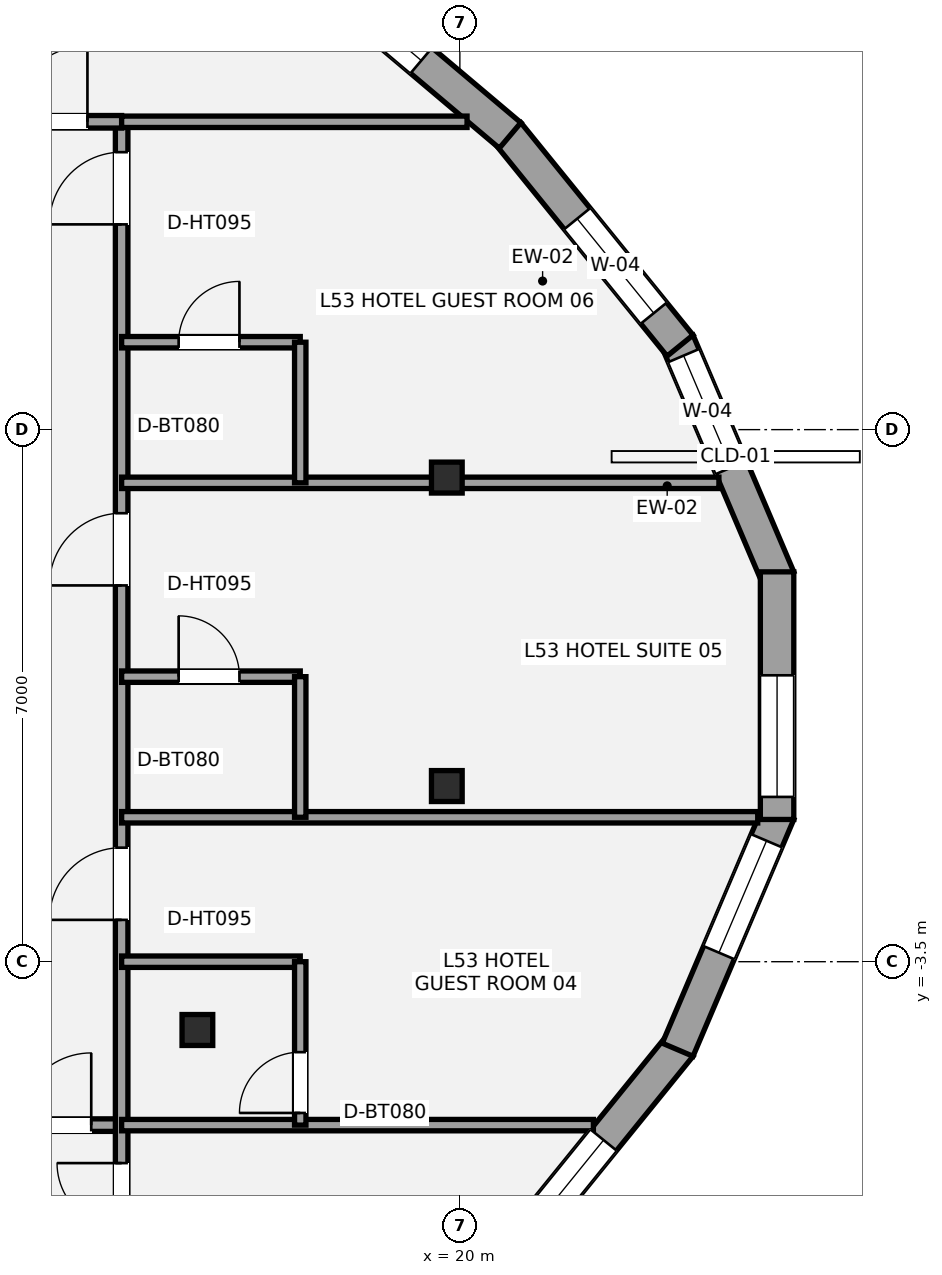
"""IFC4 building model, lengths in metres.
Left out: names, types, materials, properties, quantities, classifications, styles, units other than length and angle.
Written with IfcOpenShell. Run it as: python <this file> out.ifc"""

import sys

from ifc_helpers import new_model, si_unit, direction, frame, frame_2d, origin, origin_2d, place, context, subcontext, project, spatial, rectangle, i_section, extrude, element, fill, save


model = new_model("IFC4")
c1 = context("Model", 3, precision=1e-05, world=origin(), true_north=direction((0.0, 1.0)))
c2 = subcontext(c1, "Body", "Model", "MODEL_VIEW")
j1 = project(units=[si_unit("LENGTHUNIT", "METRE"), si_unit("PLANEANGLEUNIT", "RADIAN")], contexts=[c1])
p1 = place(None, origin())
s1 = spatial("IfcSite", under=j1, at=p1, CompositionType="ELEMENT")
p2 = place(p1, origin())
s2 = spatial("IfcBuilding", under=s1, at=p2, CompositionType="ELEMENT")
p3 = place(p2, frame((0.0, 0.0, 191.8)))
s3 = spatial("IfcBuildingStorey", under=s2, at=p3, CompositionType="ELEMENT", Elevation=191.8)
for number, where, z_axis, x_axis in (
    (1, (19.828, 2.869, 0.0), (0.0, 0.0, 1.0), (1.0, 0.0, 0.0)),
    (2, (16.547, -4.398, 0.0), (0.0, 0.0, 1.0), (1.0, 0.0, 0.0)),
    (3, (19.828, -1.189, 0.0), (0.0, 0.0, 1.0), (1.0, 0.0, 0.0)),
):
    element("IfcColumn", number, at=place(p3, frame(where, z_axis=z_axis, x_axis=x_axis)), inside=s3, PredefinedType="COLUMN", context=c2, shape_type="SweptSolid", body=[
        extrude(i_section(OverallWidth=0.404, OverallDepth=0.407, WebThickness=0.027, FlangeThickness=0.044, at=origin_2d()), origin(), (0.0, 0.0, 1.0), 3.2),
    ])
p4 = place(p3, frame((22.865, 4.658, 0.0), z_axis=(0.0, 0.0, 1.0), x_axis=(0.391568154721, -0.920149107595, 0.0)))
e4 = element("IfcWall", 4, at=p4, inside=s3, PredefinedType="STANDARD", context=c2, shape_type="SweptSolid", body=[
    extrude(rectangle(XDim=3.385, YDim=0.44, at=frame_2d((1.693, 0.0))), origin(), (0.0, 0.0, 1.0), 2.315),
])
p5 = place(p4, frame((0.2, 0.0, 0.58)))
e5 = element("IfcOpeningElement", 5, at=p5, cuts=e4, PredefinedType="OPENING", context=c2, shape_type="SweptSolid", body=[
    extrude(rectangle(XDim=1.6, YDim=1.55, at=frame_2d((0.8, 0.775))), frame((0.0, 0.23, 0.0), z_axis=(0.0, -1.0, 0.0), x_axis=(1.0, 0.0, 0.0)), (0.0, 0.0, 1.0), 0.46),
])
p6 = place(p3, frame((20.632, 7.4, 0.0), z_axis=(0.0, 0.0, 1.0), x_axis=(0.629697919329, -0.776840093193, 0.0)))
e6 = element("IfcWall", 6, at=p6, inside=s3, PredefinedType="STANDARD", context=c2, shape_type="SweptSolid", body=[
    extrude(rectangle(XDim=3.597, YDim=0.44, at=frame_2d((1.799, 0.0))), origin(), (0.0, 0.0, 1.0), 2.315),
])
p7 = place(p6, frame((1.448, 0.0, 0.58)))
e7 = element("IfcOpeningElement", 7, at=p7, cuts=e6, PredefinedType="OPENING", context=c2, shape_type="SweptSolid", body=[
    extrude(rectangle(XDim=1.6, YDim=1.55, at=frame_2d((0.8, 0.775))), frame((0.0, 0.23, 0.0), z_axis=(0.0, -1.0, 0.0), x_axis=(1.0, 0.0, 0.0)), (0.0, 0.0, 1.0), 0.46),
])
p8 = place(p3, frame((17.779, 9.802, 0.0), z_axis=(0.0, 0.0, 1.0), x_axis=(0.764269547527, -0.644896936512, 0.0)))
e8 = element("IfcWall", 8, at=p8, inside=s3, PredefinedType="STANDARD", context=c2, shape_type="SweptSolid", body=[
    extrude(rectangle(XDim=3.771, YDim=0.44, at=frame_2d((1.886, 0.0))), origin(), (0.0, 0.0, 1.0), 2.315),
])
p9 = place(p8, frame((0.643, 0.0, 0.58)))
e9 = element("IfcOpeningElement", 9, at=p9, cuts=e8, PredefinedType="OPENING", context=c2, shape_type="SweptSolid", body=[
    extrude(rectangle(XDim=1.6, YDim=1.55, at=frame_2d((0.8, 0.775))), frame((0.0, 0.23, 0.0), z_axis=(0.0, -1.0, 0.0), x_axis=(1.0, 0.0, 0.0)), (0.0, 0.0, 1.0), 0.46),
])
p10 = place(p3, frame((22.897, -4.605, 0.0), z_axis=(0.0, 0.0, 1.0), x_axis=(-0.629697919329, -0.776840093193, 0.0)))
e10 = element("IfcWall", 10, at=p10, inside=s3, PredefinedType="STANDARD", context=c2, shape_type="SweptSolid", body=[
    extrude(rectangle(XDim=3.597, YDim=0.44, at=frame_2d((1.799, 0.0))), origin(), (0.0, 0.0, 1.0), 2.315),
])
p11 = place(p10, frame((1.597, 0.0, 0.58)))
e11 = element("IfcOpeningElement", 11, at=p11, cuts=e10, PredefinedType="OPENING", context=c2, shape_type="SweptSolid", body=[
    extrude(rectangle(XDim=1.6, YDim=1.55, at=frame_2d((0.8, 0.775))), frame((0.0, 0.23, 0.0), z_axis=(0.0, -1.0, 0.0), x_axis=(1.0, 0.0, 0.0)), (0.0, 0.0, 1.0), 0.46),
])
p12 = place(p3, frame((24.191, -1.543, 0.0), z_axis=(0.0, 0.0, 1.0), x_axis=(-0.391568154721, -0.920149107595, 0.0)))
e12 = element("IfcWall", 12, at=p12, inside=s3, PredefinedType="STANDARD", context=c2, shape_type="SweptSolid", body=[
    extrude(rectangle(XDim=3.385, YDim=0.44, at=frame_2d((1.693, 0.0))), origin(), (0.0, 0.0, 1.0), 2.315),
])
p13 = place(p12, frame((0.398, 0.0, 0.58)))
e13 = element("IfcOpeningElement", 13, at=p13, cuts=e12, PredefinedType="OPENING", context=c2, shape_type="SweptSolid", body=[
    extrude(rectangle(XDim=1.6, YDim=1.55, at=frame_2d((0.8, 0.775))), frame((0.0, 0.23, 0.0), z_axis=(0.0, -1.0, 0.0), x_axis=(1.0, 0.0, 0.0)), (0.0, 0.0, 1.0), 0.46),
])
p14 = place(p3, frame((24.174, 1.629, 0.0), z_axis=(0.0, 0.0, 1.0), x_axis=(0.0, -1.0, 0.0)))
e14 = element("IfcWall", 14, at=p14, inside=s3, PredefinedType="STANDARD", context=c2, shape_type="SweptSolid", body=[
    extrude(rectangle(XDim=3.258, YDim=0.44, at=frame_2d((1.629, 0.0))), origin(), (0.0, 0.0, 1.0), 2.315),
])
p15 = place(p14, frame((1.361, 0.0, 0.58)))
e15 = element("IfcOpeningElement", 15, at=p15, cuts=e14, PredefinedType="OPENING", context=c2, shape_type="SweptSolid", body=[
    extrude(rectangle(XDim=1.6, YDim=1.55, at=frame_2d((0.8, 0.775))), frame((0.0, 0.23, 0.0), z_axis=(0.0, -1.0, 0.0), x_axis=(1.0, 0.0, 0.0)), (0.0, 0.0, 1.0), 0.46),
])
p16 = place(p3, frame((-16.1, -5.65, 0.0), z_axis=(0.0, 0.0, 1.0), x_axis=(1.0, 0.0, 0.0)))
e16 = element("IfcWall", 16, at=p16, inside=s3, PredefinedType="PARTITIONING", context=c2, shape_type="SweptSolid", body=[
    extrude(rectangle(XDim=31.65, YDim=0.165, at=frame_2d((15.825, 0.0))), origin(), (0.0, 0.0, 1.0), 2.398),
])
p17 = place(p16, frame((8.95, 0.0, 0.0)))
e17 = element("IfcOpeningElement", 17, at=p17, cuts=e16, PredefinedType="OPENING", context=c2, shape_type="SweptSolid", body=[
    extrude(rectangle(XDim=0.95, YDim=2.15, at=frame_2d((0.475, 1.075))), frame((0.0, 0.093, 0.0), z_axis=(0.0, -1.0, 0.0), x_axis=(1.0, 0.0, 0.0)), (0.0, 0.0, 1.0), 0.185),
])
p18 = place(p16, frame((18.95, 0.0, 0.0)))
e18 = element("IfcOpeningElement", 18, at=p18, cuts=e16, PredefinedType="OPENING", context=c2, shape_type="SweptSolid", body=[
    extrude(rectangle(XDim=0.95, YDim=2.15, at=frame_2d((0.475, 1.075))), frame((0.0, 0.093, 0.0), z_axis=(0.0, -1.0, 0.0), x_axis=(1.0, 0.0, 0.0)), (0.0, 0.0, 1.0), 0.185),
])
p19 = place(p16, frame((30.3, 0.0, 0.0)))
e19 = element("IfcOpeningElement", 19, at=p19, cuts=e16, PredefinedType="OPENING", context=c2, shape_type="SweptSolid", body=[
    extrude(rectangle(XDim=0.95, YDim=2.15, at=frame_2d((0.475, 1.075))), frame((0.0, 0.093, 0.0), z_axis=(0.0, -1.0, 0.0), x_axis=(1.0, 0.0, 0.0)), (0.0, 0.0, 1.0), 0.185),
])
p20 = place(p3, frame((15.55, -11.036, 0.0), z_axis=(0.0, 0.0, 1.0), x_axis=(0.0, 1.0, 0.0)))
e20 = element("IfcWall", 20, at=p20, inside=s3, PredefinedType="PARTITIONING", context=c2, shape_type="SweptSolid", body=[
    extrude(rectangle(XDim=18.586, YDim=0.165, at=frame_2d((9.293, 0.0))), origin(), (0.0, 0.0, 1.0), 2.473),
])
p21 = place(p20, frame((4.037, 0.0, 0.0)))
e21 = element("IfcOpeningElement", 21, at=p21, cuts=e20, PredefinedType="OPENING", context=c2, shape_type="SweptSolid", body=[
    extrude(rectangle(XDim=0.85, YDim=2.1, at=frame_2d((0.425, 1.05))), frame((0.0, 0.093, 0.0), z_axis=(0.0, -1.0, 0.0), x_axis=(1.0, 0.0, 0.0)), (0.0, 0.0, 1.0), 0.185),
])
p22 = place(p20, frame((8.086, 0.0, 0.0)))
e22 = element("IfcOpeningElement", 22, at=p22, cuts=e20, PredefinedType="OPENING", context=c2, shape_type="SweptSolid", body=[
    extrude(rectangle(XDim=0.95, YDim=2.15, at=frame_2d((0.475, 1.075))), frame((0.0, 0.093, 0.0), z_axis=(0.0, -1.0, 0.0), x_axis=(1.0, 0.0, 0.0)), (0.0, 0.0, 1.0), 0.185),
])
p23 = place(p20, frame((12.487, 0.0, 0.0)))
e23 = element("IfcOpeningElement", 23, at=p23, cuts=e20, PredefinedType="OPENING", context=c2, shape_type="SweptSolid", body=[
    extrude(rectangle(XDim=0.95, YDim=2.15, at=frame_2d((0.475, 1.075))), frame((0.0, 0.093, 0.0), z_axis=(0.0, -1.0, 0.0), x_axis=(1.0, 0.0, 0.0)), (0.0, 0.0, 1.0), 0.185),
])
p24 = place(p20, frame((17.237, 0.0, 0.0)))
e24 = element("IfcOpeningElement", 24, at=p24, cuts=e20, PredefinedType="OPENING", context=c2, shape_type="SweptSolid", body=[
    extrude(rectangle(XDim=0.95, YDim=2.15, at=frame_2d((0.475, 1.075))), frame((0.0, 0.093, 0.0), z_axis=(0.0, -1.0, 0.0), x_axis=(1.0, 0.0, 0.0)), (0.0, 0.0, 1.0), 0.185),
])
p25 = place(p3, frame((13.8, 7.55, 0.0), z_axis=(0.0, 0.0, 1.0), x_axis=(1.0, 0.0, 0.0)))
e25 = element("IfcWall", 25, at=p25, inside=s3, PredefinedType="PARTITIONING", context=c2, shape_type="SweptSolid", body=[
    extrude(rectangle(XDim=1.75, YDim=0.165, at=frame_2d((0.875, 0.0))), origin(), (0.0, 0.0, 1.0), 3.02),
])
p26 = place(p25, frame((0.3, 0.0, 0.0)))
e26 = element("IfcOpeningElement", 26, at=p26, cuts=e25, PredefinedType="OPENING", context=c2, shape_type="SweptSolid", body=[
    extrude(rectangle(XDim=1.0, YDim=2.15, at=frame_2d((0.5, 1.075))), frame((0.0, 0.093, 0.0), z_axis=(0.0, -1.0, 0.0), x_axis=(1.0, 0.0, 0.0)), (0.0, 0.0, 1.0), 0.185),
])
p27 = place(p3, frame((15.55, 7.55, 0.0), z_axis=(0.0, 0.0, 1.0), x_axis=(1.0, 0.0, 0.0)))
e27 = element("IfcWall", 27, at=p27, inside=s3, PredefinedType="PLUMBINGWALL", context=c2, shape_type="SweptSolid", body=[
    extrude(rectangle(XDim=4.544, YDim=0.15, at=frame_2d((2.272, 0.0))), origin(), (0.0, 0.0, 1.0), 3.02),
])
p28 = place(p3, frame((15.55, -5.65, 0.0), z_axis=(0.0, 0.0, 1.0), x_axis=(1.0, 0.0, 0.0)))
e28 = element("IfcWall", 28, at=p28, inside=s3, PredefinedType="PLUMBINGWALL", context=c2, shape_type="SweptSolid", body=[
    extrude(rectangle(XDim=6.207, YDim=0.15, at=frame_2d((3.104, 0.0))), origin(), (0.0, 0.0, 1.0), 2.473),
])
p29 = place(p3, frame((15.55, -1.6, 0.0), z_axis=(0.0, 0.0, 1.0), x_axis=(1.0, 0.0, 0.0)))
e29 = element("IfcWall", 29, at=p29, inside=s3, PredefinedType="PLUMBINGWALL", context=c2, shape_type="SweptSolid", body=[
    extrude(rectangle(XDim=8.369, YDim=0.15, at=frame_2d((4.185, 0.0))), origin(), (0.0, 0.0, 1.0), 2.398),
])
p30 = place(p3, frame((15.55, 2.8, 0.0), z_axis=(0.0, 0.0, 1.0), x_axis=(1.0, 0.0, 0.0)))
e30 = element("IfcWall", 30, at=p30, inside=s3, PredefinedType="PLUMBINGWALL", context=c2, shape_type="SweptSolid", body=[
    extrude(rectangle(XDim=7.858, YDim=0.15, at=frame_2d((3.929, 0.0))), origin(), (0.0, 0.0, 1.0), 2.473),
])
p31 = place(p3, frame((15.55, -3.5, 0.0), z_axis=(0.0, 0.0, 1.0), x_axis=(1.0, 0.0, 0.0)))
e31 = element("IfcWall", 31, at=p31, inside=s3, PredefinedType="PLUMBINGWALL", context=c2, shape_type="SweptSolid", body=[
    extrude(rectangle(XDim=2.35, YDim=0.15, at=frame_2d((1.175, 0.0))), origin(), (0.0, 0.0, 1.0), 2.398),
])
p32 = place(p3, frame((17.9, -5.65, 0.0), z_axis=(0.0, 0.0, 1.0), x_axis=(0.0, 1.0, 0.0)))
e32 = element("IfcWall", 32, at=p32, inside=s3, PredefinedType="PLUMBINGWALL", context=c2, shape_type="SweptSolid", body=[
    extrude(rectangle(XDim=2.15, YDim=0.15, at=frame_2d((1.075, 0.0))), origin(), (0.0, 0.0, 1.0), 2.473),
])
p33 = place(p32, frame((0.16, 0.0, 0.0)))
e33 = element("IfcOpeningElement", 33, at=p33, cuts=e32, PredefinedType="OPENING", context=c2, shape_type="SweptSolid", body=[
    extrude(rectangle(XDim=0.8, YDim=2.1, at=frame_2d((0.4, 1.05))), frame((0.0, 0.085, 0.0), z_axis=(0.0, -1.0, 0.0), x_axis=(1.0, 0.0, 0.0)), (0.0, 0.0, 1.0), 0.17),
])
p34 = place(p3, frame((15.55, 0.25, 0.0), z_axis=(0.0, 0.0, 1.0), x_axis=(1.0, 0.0, 0.0)))
e34 = element("IfcWall", 34, at=p34, inside=s3, PredefinedType="PLUMBINGWALL", context=c2, shape_type="SweptSolid", body=[
    extrude(rectangle(XDim=2.35, YDim=0.15, at=frame_2d((1.175, 0.0))), origin(), (0.0, 0.0, 1.0), 2.473),
])
p35 = place(p34, frame((0.75, 0.0, 0.0)))
e35 = element("IfcOpeningElement", 35, at=p35, cuts=e34, PredefinedType="OPENING", context=c2, shape_type="SweptSolid", body=[
    extrude(rectangle(XDim=0.8, YDim=2.1, at=frame_2d((0.4, 1.05))), frame((0.0, 0.085, 0.0), z_axis=(0.0, -1.0, 0.0), x_axis=(1.0, 0.0, 0.0)), (0.0, 0.0, 1.0), 0.17),
])
p36 = place(p3, frame((17.9, -1.6, 0.0), z_axis=(0.0, 0.0, 1.0), x_axis=(0.0, 1.0, 0.0)))
e36 = element("IfcWall", 36, at=p36, inside=s3, PredefinedType="PLUMBINGWALL", context=c2, shape_type="SweptSolid", body=[
    extrude(rectangle(XDim=1.85, YDim=0.15, at=frame_2d((0.925, 0.0))), origin(), (0.0, 0.0, 1.0), 3.02),
])
p37 = place(p3, frame((15.55, 4.65, 0.0), z_axis=(0.0, 0.0, 1.0), x_axis=(1.0, 0.0, 0.0)))
e37 = element("IfcWall", 37, at=p37, inside=s3, PredefinedType="PLUMBINGWALL", context=c2, shape_type="SweptSolid", body=[
    extrude(rectangle(XDim=2.35, YDim=0.15, at=frame_2d((1.175, 0.0))), origin(), (0.0, 0.0, 1.0), 3.02),
])
p38 = place(p37, frame((0.75, 0.0, 0.0)))
e38 = element("IfcOpeningElement", 38, at=p38, cuts=e37, PredefinedType="OPENING", context=c2, shape_type="SweptSolid", body=[
    extrude(rectangle(XDim=0.8, YDim=2.1, at=frame_2d((0.4, 1.05))), frame((0.0, 0.085, 0.0), z_axis=(0.0, -1.0, 0.0), x_axis=(1.0, 0.0, 0.0)), (0.0, 0.0, 1.0), 0.17),
])
p39 = place(p3, frame((17.9, 2.8, 0.0), z_axis=(0.0, 0.0, 1.0), x_axis=(0.0, 1.0, 0.0)))
e39 = element("IfcWall", 39, at=p39, inside=s3, PredefinedType="PLUMBINGWALL", context=c2, shape_type="SweptSolid", body=[
    extrude(rectangle(XDim=1.85, YDim=0.15, at=frame_2d((0.925, 0.0))), origin(), (0.0, 0.0, 1.0), 3.02),
])
p40 = place(p5, origin())
e40 = element("IfcWindow", 40, at=p40, inside=s3, PartitioningType="SINGLE_PANEL", PredefinedType="WINDOW", context=c2, shape_type="SweptSolid", body=[
    extrude(rectangle(XDim=1.6, YDim=1.55, at=frame_2d((0.8, 0.775))), frame((0.0, -0.01, 0.0), z_axis=(0.0, -1.0, 0.0), x_axis=(1.0, 0.0, 0.0)), (0.0, 0.0, 1.0), 0.06),
])
fill(e5, e40)
p41 = place(p7, origin())
e41 = element("IfcWindow", 41, at=p41, inside=s3, PartitioningType="SINGLE_PANEL", PredefinedType="WINDOW", context=c2, shape_type="SweptSolid", body=[
    extrude(rectangle(XDim=1.6, YDim=1.55, at=frame_2d((0.8, 0.775))), frame((0.0, -0.01, 0.0), z_axis=(0.0, -1.0, 0.0), x_axis=(1.0, 0.0, 0.0)), (0.0, 0.0, 1.0), 0.06),
])
fill(e7, e41)
p42 = place(p9, origin())
e42 = element("IfcWindow", 42, at=p42, inside=s3, PartitioningType="SINGLE_PANEL", PredefinedType="WINDOW", context=c2, shape_type="SweptSolid", body=[
    extrude(rectangle(XDim=1.6, YDim=1.55, at=frame_2d((0.8, 0.775))), frame((0.0, -0.01, 0.0), z_axis=(0.0, -1.0, 0.0), x_axis=(1.0, 0.0, 0.0)), (0.0, 0.0, 1.0), 0.06),
])
fill(e9, e42)
p43 = place(p11, origin())
e43 = element("IfcWindow", 43, at=p43, inside=s3, PartitioningType="SINGLE_PANEL", PredefinedType="WINDOW", context=c2, shape_type="SweptSolid", body=[
    extrude(rectangle(XDim=1.6, YDim=1.55, at=frame_2d((0.8, 0.775))), frame((0.0, -0.01, 0.0), z_axis=(0.0, -1.0, 0.0), x_axis=(1.0, 0.0, 0.0)), (0.0, 0.0, 1.0), 0.06),
])
fill(e11, e43)
p44 = place(p13, origin())
e44 = element("IfcWindow", 44, at=p44, inside=s3, PartitioningType="SINGLE_PANEL", PredefinedType="WINDOW", context=c2, shape_type="SweptSolid", body=[
    extrude(rectangle(XDim=1.6, YDim=1.55, at=frame_2d((0.8, 0.775))), frame((0.0, -0.01, 0.0), z_axis=(0.0, -1.0, 0.0), x_axis=(1.0, 0.0, 0.0)), (0.0, 0.0, 1.0), 0.06),
])
fill(e13, e44)
p45 = place(p15, origin())
e45 = element("IfcWindow", 45, at=p45, inside=s3, PartitioningType="SINGLE_PANEL", PredefinedType="WINDOW", context=c2, shape_type="SweptSolid", body=[
    extrude(rectangle(XDim=1.6, YDim=1.55, at=frame_2d((0.8, 0.775))), frame((0.0, -0.01, 0.0), z_axis=(0.0, -1.0, 0.0), x_axis=(1.0, 0.0, 0.0)), (0.0, 0.0, 1.0), 0.06),
])
fill(e15, e45)
p46 = place(p26, origin())
e46 = element("IfcDoor", 46, at=p46, inside=s3, OperationType="SINGLE_SWING_RIGHT", PredefinedType="DOOR", context=c2, shape_type="SweptSolid", body=[
    extrude(rectangle(XDim=1.0, YDim=2.15, at=frame_2d((0.5, 1.075))), frame((0.0, 0.025, 0.0), z_axis=(0.0, -1.0, 0.0), x_axis=(1.0, 0.0, 0.0)), (0.0, 0.0, 1.0), 0.05),
])
fill(e26, e46)
p47 = place(p21, origin())
e47 = element("IfcDoor", 47, at=p47, inside=s3, OperationType="SINGLE_SWING_RIGHT", PredefinedType="DOOR", context=c2, shape_type="SweptSolid", body=[
    extrude(rectangle(XDim=0.85, YDim=2.1, at=frame_2d((0.425, 1.05))), frame((0.0, 0.025, 0.0), z_axis=(0.0, -1.0, 0.0), x_axis=(1.0, 0.0, 0.0)), (0.0, 0.0, 1.0), 0.05),
])
fill(e21, e47)
p48 = place(p19, origin())
e48 = element("IfcDoor", 48, at=p48, inside=s3, OperationType="SINGLE_SWING_RIGHT", PredefinedType="DOOR", context=c2, shape_type="SweptSolid", body=[
    extrude(rectangle(XDim=0.95, YDim=2.15, at=frame_2d((0.475, 1.075))), frame((0.0, 0.025, 0.0), z_axis=(0.0, -1.0, 0.0), x_axis=(1.0, 0.0, 0.0)), (0.0, 0.0, 1.0), 0.05),
])
fill(e19, e48)
p49 = place(p22, origin())
e49 = element("IfcDoor", 49, at=p49, inside=s3, OperationType="SINGLE_SWING_LEFT", PredefinedType="DOOR", context=c2, shape_type="SweptSolid", body=[
    extrude(rectangle(XDim=0.95, YDim=2.15, at=frame_2d((0.475, 1.075))), frame((0.0, 0.025, 0.0), z_axis=(0.0, -1.0, 0.0), x_axis=(1.0, 0.0, 0.0)), (0.0, 0.0, 1.0), 0.05),
])
fill(e22, e49)
p50 = place(p33, origin())
e50 = element("IfcDoor", 50, at=p50, inside=s3, OperationType="SINGLE_SWING_LEFT", PredefinedType="DOOR", context=c2, shape_type="SweptSolid", body=[
    extrude(rectangle(XDim=0.8, YDim=2.1, at=frame_2d((0.4, 1.05))), frame((0.0, 0.025, 0.0), z_axis=(0.0, -1.0, 0.0), x_axis=(1.0, 0.0, 0.0)), (0.0, 0.0, 1.0), 0.05),
])
fill(e33, e50)
p51 = place(p23, origin())
e51 = element("IfcDoor", 51, at=p51, inside=s3, OperationType="SINGLE_SWING_LEFT", PredefinedType="DOOR", context=c2, shape_type="SweptSolid", body=[
    extrude(rectangle(XDim=0.95, YDim=2.15, at=frame_2d((0.475, 1.075))), frame((0.0, 0.025, 0.0), z_axis=(0.0, -1.0, 0.0), x_axis=(1.0, 0.0, 0.0)), (0.0, 0.0, 1.0), 0.05),
])
fill(e23, e51)
p52 = place(p35, origin())
e52 = element("IfcDoor", 52, at=p52, inside=s3, OperationType="SINGLE_SWING_LEFT", PredefinedType="DOOR", context=c2, shape_type="SweptSolid", body=[
    extrude(rectangle(XDim=0.8, YDim=2.1, at=frame_2d((0.4, 1.05))), frame((0.0, 0.025, 0.0), z_axis=(0.0, -1.0, 0.0), x_axis=(1.0, 0.0, 0.0)), (0.0, 0.0, 1.0), 0.05),
])
fill(e35, e52)
p53 = place(p24, origin())
e53 = element("IfcDoor", 53, at=p53, inside=s3, OperationType="SINGLE_SWING_LEFT", PredefinedType="DOOR", context=c2, shape_type="SweptSolid", body=[
    extrude(rectangle(XDim=0.95, YDim=2.15, at=frame_2d((0.475, 1.075))), frame((0.0, 0.025, 0.0), z_axis=(0.0, -1.0, 0.0), x_axis=(1.0, 0.0, 0.0)), (0.0, 0.0, 1.0), 0.05),
])
fill(e24, e53)
p54 = place(p38, origin())
e54 = element("IfcDoor", 54, at=p54, inside=s3, OperationType="SINGLE_SWING_RIGHT", PredefinedType="DOOR", context=c2, shape_type="SweptSolid", body=[
    extrude(rectangle(XDim=0.8, YDim=2.1, at=frame_2d((0.4, 1.05))), frame((0.0, 0.025, 0.0), z_axis=(0.0, -1.0, 0.0), x_axis=(1.0, 0.0, 0.0)), (0.0, 0.0, 1.0), 0.05),
])
fill(e38, e54)
save(model, sys.argv[1])
